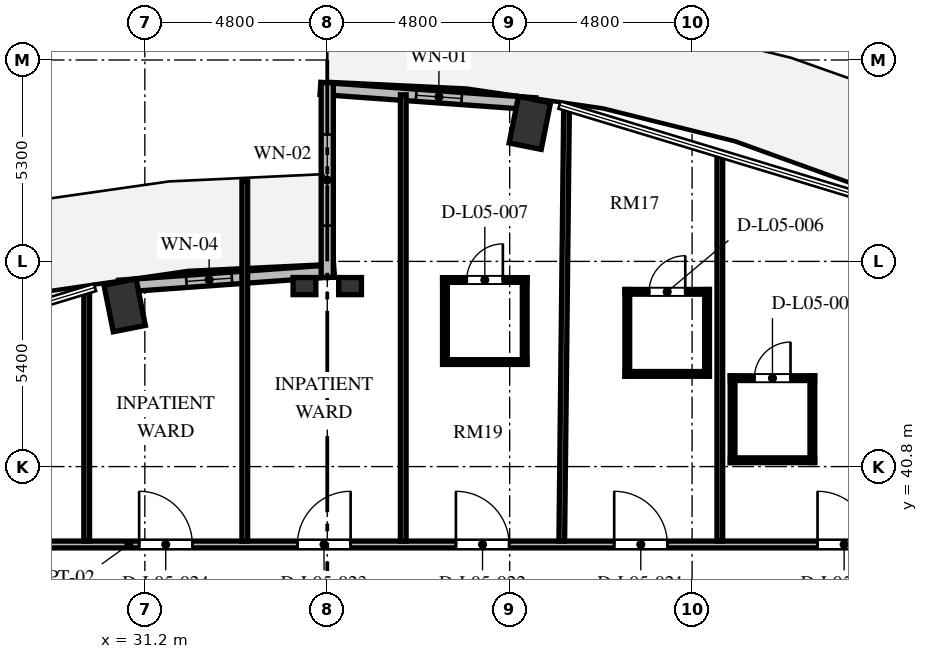
"""IFC4 building model, lengths in metres.
Left out: names, types, materials, properties, quantities, classifications, styles, units other than length and angle.
Written with IfcOpenShell. Run it as: python <this file> out.ifc"""

import sys

from ifc_helpers import new_model, si_unit, direction, frame, frame_2d, origin, origin_2d, place, context, subcontext, project, spatial, rectangle, extrude, element, fill, save


model = new_model("IFC4")
c1 = context("Model", 3, precision=1e-05, world=origin(), true_north=direction((0.0, 1.0)))
c2 = subcontext(c1, "Body", "Model", "MODEL_VIEW")
j1 = project(units=[si_unit("LENGTHUNIT", "METRE"), si_unit("PLANEANGLEUNIT", "RADIAN")], contexts=[c1])
p1 = place(None, origin())
s1 = spatial("IfcSite", under=j1, at=p1, CompositionType="ELEMENT")
p2 = place(p1, origin())
s2 = spatial("IfcBuilding", under=s1, at=p2, CompositionType="ELEMENT")
p3 = place(p2, frame((0.0, 0.0, 25.2)))
s3 = spatial("IfcBuildingStorey", under=s2, at=p3, CompositionType="ELEMENT", Elevation=25.2)
for number, where, z_axis, x_axis in (
    (1, (41.331, 49.844, 0.0), (0.0, 0.0, 1.0), (0.195, 0.981, 0.0)),
    (2, (30.669, 45.044, 0.0), (0.0, 0.0, 1.0), (-0.195, 0.981, 0.0)),
):
    element("IfcColumn", number, at=place(p3, frame(where, z_axis=z_axis, x_axis=x_axis)), inside=s3, PredefinedType="COLUMN", context=c2, shape_type="SweptSolid", body=[
        extrude(rectangle(XDim=1.25, YDim=0.86, at=origin_2d()), origin(), (0.0, 0.0, 1.0), 3.648),
    ])
for number, where, z_axis, x_axis in (
    (3, (35.4, 45.55, 0.0), (0.0, 0.0, 1.0), (1.0, 0.0, 0.0)),
    (4, (36.6, 45.55, 0.0), (0.0, 0.0, 1.0), (1.0, 0.0, 0.0)),
):
    element("IfcColumn", number, at=place(p3, frame(where, z_axis=z_axis, x_axis=x_axis)), inside=s3, PredefinedType="PILASTER", context=c2, shape_type="SweptSolid", body=[
        extrude(rectangle(XDim=0.6, YDim=0.45, at=origin_2d()), origin(), (0.0, 0.0, 1.0), 3.648),
    ])
p4 = place(p3, frame((41.481, 50.346, 0.0), z_axis=(0.0, 0.0, 1.0), x_axis=(-0.997422321809, 0.071754525696, 0.0)))
e5 = element("IfcWall", 5, at=p4, inside=s3, PredefinedType="SOLIDWALL", context=c2, shape_type="SweptSolid", body=[
    extrude(rectangle(XDim=5.675, YDim=0.32, at=frame_2d((2.838, 0.0))), origin(), (0.0, 0.0, 1.0), 3.428),
])
p5 = place(p4, frame((1.949, 0.0, 0.85)))
e6 = element("IfcOpeningElement", 6, at=p5, cuts=e5, PredefinedType="OPENING", context=c2, shape_type="SweptSolid", body=[
    extrude(rectangle(XDim=1.2, YDim=2.2, at=frame_2d((0.6, 1.1))), frame((0.0, 0.17, 0.0), z_axis=(0.0, -1.0, 0.0), x_axis=(1.0, 0.0, 0.0)), (0.0, 0.0, 1.0), 0.34),
])
p6 = place(p3, frame((36.179, 45.953, 0.0), z_axis=(0.0, 0.0, 1.0), x_axis=(-0.997421878774, -0.071760683825, 0.0)))
e7 = element("IfcWall", 7, at=p6, inside=s3, PredefinedType="SOLIDWALL", context=c2, shape_type="SweptSolid", body=[
    extrude(rectangle(XDim=5.675, YDim=0.32, at=frame_2d((2.837, 0.0))), origin(), (0.0, 0.0, 1.0), 3.428),
])
p7 = place(p6, frame((2.696, 0.0, 0.85)))
e8 = element("IfcOpeningElement", 8, at=p7, cuts=e7, PredefinedType="OPENING", context=c2, shape_type="SweptSolid", body=[
    extrude(rectangle(XDim=1.2, YDim=1.8, at=frame_2d((0.6, 0.9))), frame((0.0, 0.17, 0.0), z_axis=(0.0, -1.0, 0.0), x_axis=(1.0, 0.0, 0.0)), (0.0, 0.0, 1.0), 0.34),
])
p8 = place(p3, frame((36.0, 50.9, 0.0), z_axis=(0.0, 0.0, 1.0), x_axis=(0.0, -1.0, 0.0)))
e9 = element("IfcWall", 9, at=p8, inside=s3, PredefinedType="SOLIDWALL", context=c2, shape_type="SweptSolid", body=[
    extrude(rectangle(XDim=5.12, YDim=0.32, at=frame_2d((2.56, 0.0))), origin(), (0.0, 0.0, 1.0), 3.428),
])
p9 = place(p8, frame((1.36, 0.0, 0.84)))
e10 = element("IfcOpeningElement", 10, at=p9, cuts=e9, PredefinedType="OPENING", context=c2, shape_type="SweptSolid", body=[
    extrude(rectangle(XDim=2.4, YDim=2.04, at=frame_2d((1.2, 1.02))), frame((0.0, 0.17, 0.0), z_axis=(0.0, -1.0, 0.0), x_axis=(1.0, 0.0, 0.0)), (0.0, 0.0, 1.0), 0.34),
])
p10 = place(p3, frame((23.31, 38.75, 0.0), z_axis=(0.0, 0.0, 1.0), x_axis=(1.0, 0.0, 0.0)))
e11 = element("IfcWall", 11, at=p10, inside=s3, PredefinedType="PARTITIONING", context=c2, shape_type="SweptSolid", body=[
    extrude(rectangle(XDim=29.88, YDim=0.18, at=frame_2d((14.94, 0.0))), origin(), (0.0, 0.0, 1.0), 3.053),
])
p11 = place(p10, frame((25.591, 0.0, 0.0)))
e12 = element("IfcOpeningElement", 12, at=p11, cuts=e11, PredefinedType="OPENING", context=c2, shape_type="SweptSolid", body=[
    extrude(rectangle(XDim=1.4, YDim=2.2, at=frame_2d((0.7, 1.1))), frame((0.0, 0.1, 0.0), z_axis=(0.0, -1.0, 0.0), x_axis=(1.0, 0.0, 0.0)), (0.0, 0.0, 1.0), 0.2),
])
p12 = place(p10, frame((20.24, 0.0, 0.0)))
e13 = element("IfcOpeningElement", 13, at=p12, cuts=e11, PredefinedType="OPENING", context=c2, shape_type="SweptSolid", body=[
    extrude(rectangle(XDim=1.4, YDim=2.2, at=frame_2d((0.7, 1.1))), frame((0.0, 0.1, 0.0), z_axis=(0.0, -1.0, 0.0), x_axis=(1.0, 0.0, 0.0)), (0.0, 0.0, 1.0), 0.2),
])
p13 = place(p10, frame((16.075, 0.0, 0.0)))
e14 = element("IfcOpeningElement", 14, at=p13, cuts=e11, PredefinedType="OPENING", context=c2, shape_type="SweptSolid", body=[
    extrude(rectangle(XDim=1.4, YDim=2.2, at=frame_2d((0.7, 1.1))), frame((0.0, 0.1, 0.0), z_axis=(0.0, -1.0, 0.0), x_axis=(1.0, 0.0, 0.0)), (0.0, 0.0, 1.0), 0.2),
])
p14 = place(p10, frame((11.905, 0.0, 0.0)))
e15 = element("IfcOpeningElement", 15, at=p14, cuts=e11, PredefinedType="OPENING", context=c2, shape_type="SweptSolid", body=[
    extrude(rectangle(XDim=1.4, YDim=2.2, at=frame_2d((0.7, 1.1))), frame((0.0, 0.1, 0.0), z_axis=(0.0, -1.0, 0.0), x_axis=(1.0, 0.0, 0.0)), (0.0, 0.0, 1.0), 0.2),
])
p15 = place(p10, frame((7.74, 0.0, 0.0)))
e16 = element("IfcOpeningElement", 16, at=p15, cuts=e11, PredefinedType="OPENING", context=c2, shape_type="SweptSolid", body=[
    extrude(rectangle(XDim=1.4, YDim=2.2, at=frame_2d((0.7, 1.1))), frame((0.0, 0.1, 0.0), z_axis=(0.0, -1.0, 0.0), x_axis=(1.0, 0.0, 0.0)), (0.0, 0.0, 1.0), 0.2),
])
p16 = place(p10, frame((2.639, 0.0, 0.0)))
e17 = element("IfcOpeningElement", 17, at=p16, cuts=e11, PredefinedType="OPENING", context=c2, shape_type="SweptSolid", body=[
    extrude(rectangle(XDim=1.4, YDim=2.2, at=frame_2d((0.7, 1.1))), frame((0.0, 0.1, 0.0), z_axis=(0.0, -1.0, 0.0), x_axis=(1.0, 0.0, 0.0)), (0.0, 0.0, 1.0), 0.2),
])
p17 = place(p3, frame((29.67, 38.84, 0.0), z_axis=(0.0, 0.0, 1.0), x_axis=(0.0, 1.0, 0.0)))
e18 = element("IfcWall", 18, at=p17, inside=s3, PredefinedType="PARTITIONING", context=c2, shape_type="SweptSolid", body=[
    extrude(rectangle(XDim=6.596, YDim=0.15, at=frame_2d((3.298, 0.0))), origin(), (0.0, 0.0, 1.0), 3.428),
])
p18 = place(p3, frame((33.83, 38.84, 0.0), z_axis=(0.0, 0.0, 1.0), x_axis=(0.0, 1.0, 0.0)))
e19 = element("IfcWall", 19, at=p18, inside=s3, PredefinedType="PARTITIONING", context=c2, shape_type="SweptSolid", body=[
    extrude(rectangle(XDim=9.466, YDim=0.15, at=frame_2d((4.733, 0.0))), origin(), (0.0, 0.0, 1.0), 3.428),
])
p19 = place(p3, frame((38.0, 38.84, 0.0), z_axis=(0.0, 0.0, 1.0), x_axis=(0.0, 1.0, 0.0)))
e20 = element("IfcWall", 20, at=p19, inside=s3, PredefinedType="PARTITIONING", context=c2, shape_type="SweptSolid", body=[
    extrude(rectangle(XDim=11.743, YDim=0.15, at=frame_2d((5.872, 0.0))), origin(), (0.0, 0.0, 1.0), 3.428),
])
p20 = place(p3, frame((42.171, 38.84, 0.0), z_axis=(0.0, 0.0, 1.0), x_axis=(0.010986468696, 0.999939646932, 0.0)))
e21 = element("IfcWall", 21, at=p20, inside=s3, PredefinedType="PARTITIONING", context=c2, shape_type="SweptSolid", body=[
    extrude(rectangle(XDim=11.422, YDim=0.15, at=frame_2d((5.711, 0.0))), origin(), (0.0, 0.0, 1.0), 3.428),
])
p21 = place(p3, frame((46.33, 38.84, 0.0), z_axis=(0.0, 0.0, 1.0), x_axis=(0.0, 1.0, 0.0)))
e22 = element("IfcWall", 22, at=p21, inside=s3, PredefinedType="PARTITIONING", context=c2, shape_type="SweptSolid", body=[
    extrude(rectangle(XDim=10.185, YDim=0.15, at=frame_2d((5.092, 0.0))), origin(), (0.0, 0.0, 1.0), 3.428),
])
p22 = place(p3, frame((46.605, 43.127, 0.0), z_axis=(0.0, 0.0, 1.0), x_axis=(1.0, 0.0, 0.0)))
e23 = element("IfcWall", 23, at=p22, inside=s3, PredefinedType="PARTITIONING", context=c2, shape_type="SweptSolid", body=[
    extrude(rectangle(XDim=2.22, YDim=0.125, at=frame_2d((1.11, 0.0))), origin(), (0.0, 0.0, 1.0), 3.428),
])
p23 = place(p22, frame((0.635, 0.0, 0.0)))
e24 = element("IfcOpeningElement", 24, at=p23, cuts=e23, PredefinedType="OPENING", context=c2, shape_type="SweptSolid", body=[
    extrude(rectangle(XDim=0.95, YDim=2.1, at=frame_2d((0.475, 1.05))), frame((0.0, 0.073, 0.0), z_axis=(0.0, -1.0, 0.0), x_axis=(1.0, 0.0, 0.0)), (0.0, 0.0, 1.0), 0.145),
])
p24 = place(p3, frame((46.605, 40.967, 0.0), z_axis=(0.0, 0.0, 1.0), x_axis=(1.0, 0.0, 0.0)))
e25 = element("IfcWall", 25, at=p24, inside=s3, PredefinedType="PARTITIONING", context=c2, shape_type="SweptSolid", body=[
    extrude(rectangle(XDim=2.22, YDim=0.125, at=frame_2d((1.11, 0.0))), origin(), (0.0, 0.0, 1.0), 3.428),
])
for number, where, z_axis, x_axis in (
    (26, (48.765, 40.907, 0.0), (0.0, 0.0, 1.0), (0.0, 1.0, 0.0)),
    (27, (46.665, 40.907, 0.0), (0.0, 0.0, 1.0), (0.0, 1.0, 0.0)),
):
    element("IfcWall", number, at=place(p3, frame(where, z_axis=z_axis, x_axis=x_axis)), inside=s3, PredefinedType="PARTITIONING", context=c2, shape_type="SweptSolid", body=[
        extrude(rectangle(XDim=2.28, YDim=0.125, at=frame_2d((1.14, 0.0))), origin(), (0.0, 0.0, 1.0), 3.428),
    ])
p25 = place(p3, frame((43.835, 45.399, 0.0), z_axis=(0.0, 0.0, 1.0), x_axis=(1.0, 0.0, 0.0)))
e28 = element("IfcWall", 28, at=p25, inside=s3, PredefinedType="PARTITIONING", context=c2, shape_type="SweptSolid", body=[
    extrude(rectangle(XDim=2.22, YDim=0.125, at=frame_2d((1.11, 0.0))), origin(), (0.0, 0.0, 1.0), 3.013),
])
p26 = place(p25, frame((0.635, 0.0, 0.0)))
e29 = element("IfcOpeningElement", 29, at=p26, cuts=e28, PredefinedType="OPENING", context=c2, shape_type="SweptSolid", body=[
    extrude(rectangle(XDim=0.95, YDim=2.1, at=frame_2d((0.475, 1.05))), frame((0.0, 0.073, 0.0), z_axis=(0.0, -1.0, 0.0), x_axis=(1.0, 0.0, 0.0)), (0.0, 0.0, 1.0), 0.145),
])
p27 = place(p3, frame((43.835, 43.239, 0.0), z_axis=(0.0, 0.0, 1.0), x_axis=(1.0, 0.0, 0.0)))
e30 = element("IfcWall", 30, at=p27, inside=s3, PredefinedType="PARTITIONING", context=c2, shape_type="SweptSolid", body=[
    extrude(rectangle(XDim=2.22, YDim=0.125, at=frame_2d((1.11, 0.0))), origin(), (0.0, 0.0, 1.0), 3.053),
])
for number, where, z_axis, x_axis in (
    (31, (45.995, 43.179, 0.0), (0.0, 0.0, 1.0), (0.0, 1.0, 0.0)),
    (32, (43.895, 43.179, 0.0), (0.0, 0.0, 1.0), (0.0, 1.0, 0.0)),
):
    element("IfcWall", number, at=place(p3, frame(where, z_axis=z_axis, x_axis=x_axis)), inside=s3, PredefinedType="PARTITIONING", context=c2, shape_type="SweptSolid", body=[
        extrude(rectangle(XDim=2.28, YDim=0.125, at=frame_2d((1.14, 0.0))), origin(), (0.0, 0.0, 1.0), 3.428),
    ])
p28 = place(p3, frame((39.036, 45.711, 0.0), z_axis=(0.0, 0.0, 1.0), x_axis=(1.0, 0.0, 0.0)))
e33 = element("IfcWall", 33, at=p28, inside=s3, PredefinedType="PARTITIONING", context=c2, shape_type="SweptSolid", body=[
    extrude(rectangle(XDim=2.22, YDim=0.125, at=frame_2d((1.11, 0.0))), origin(), (0.0, 0.0, 1.0), 3.428),
])
p29 = place(p28, frame((0.635, 0.0, 0.0)))
e34 = element("IfcOpeningElement", 34, at=p29, cuts=e33, PredefinedType="OPENING", context=c2, shape_type="SweptSolid", body=[
    extrude(rectangle(XDim=0.95, YDim=2.1, at=frame_2d((0.475, 1.05))), frame((0.0, 0.073, 0.0), z_axis=(0.0, -1.0, 0.0), x_axis=(1.0, 0.0, 0.0)), (0.0, 0.0, 1.0), 0.145),
])
p30 = place(p3, frame((39.036, 43.551, 0.0), z_axis=(0.0, 0.0, 1.0), x_axis=(1.0, 0.0, 0.0)))
e35 = element("IfcWall", 35, at=p30, inside=s3, PredefinedType="PARTITIONING", context=c2, shape_type="SweptSolid", body=[
    extrude(rectangle(XDim=2.22, YDim=0.125, at=frame_2d((1.11, 0.0))), origin(), (0.0, 0.0, 1.0), 3.428),
])
for number, where, z_axis, x_axis in (
    (36, (41.196, 43.491, 0.0), (0.0, 0.0, 1.0), (0.0, 1.0, 0.0)),
    (37, (39.096, 43.491, 0.0), (0.0, 0.0, 1.0), (0.0, 1.0, 0.0)),
):
    element("IfcWall", number, at=place(p3, frame(where, z_axis=z_axis, x_axis=x_axis)), inside=s3, PredefinedType="PARTITIONING", context=c2, shape_type="SweptSolid", body=[
        extrude(rectangle(XDim=2.28, YDim=0.125, at=frame_2d((1.14, 0.0))), origin(), (0.0, 0.0, 1.0), 3.428),
    ])
p31 = place(p5, origin())
e38 = element("IfcWindow", 38, at=p31, inside=s3, PartitioningType="SINGLE_PANEL", PredefinedType="WINDOW", context=c2, shape_type="SweptSolid", body=[
    extrude(rectangle(XDim=1.2, YDim=2.2, at=frame_2d((0.6, 1.1))), frame((0.0, 0.03, 0.0), z_axis=(0.0, -1.0, 0.0), x_axis=(1.0, 0.0, 0.0)), (0.0, 0.0, 1.0), 0.06),
])
fill(e6, e38)
p32 = place(p7, origin())
e39 = element("IfcWindow", 39, at=p32, inside=s3, PartitioningType="SINGLE_PANEL", PredefinedType="WINDOW", context=c2, shape_type="SweptSolid", body=[
    extrude(rectangle(XDim=1.2, YDim=1.8, at=frame_2d((0.6, 0.9))), frame((0.0, 0.03, 0.0), z_axis=(0.0, -1.0, 0.0), x_axis=(1.0, 0.0, 0.0)), (0.0, 0.0, 1.0), 0.06),
])
fill(e8, e39)
p33 = place(p9, origin())
e40 = element("IfcWindow", 40, at=p33, inside=s3, PartitioningType="SINGLE_PANEL", PredefinedType="WINDOW", context=c2, shape_type="SweptSolid", body=[
    extrude(rectangle(XDim=2.4, YDim=2.04, at=frame_2d((1.2, 1.02))), frame((0.0, 0.03, 0.0), z_axis=(0.0, -1.0, 0.0), x_axis=(1.0, 0.0, 0.0)), (0.0, 0.0, 1.0), 0.06),
])
fill(e10, e40)
p34 = place(p23, origin())
e41 = element("IfcDoor", 41, at=p34, inside=s3, OperationType="SINGLE_SWING_RIGHT", PredefinedType="DOOR", context=c2, shape_type="SweptSolid", body=[
    extrude(rectangle(XDim=0.95, YDim=2.1, at=frame_2d((0.475, 1.05))), frame((0.0, 0.025, 0.0), z_axis=(0.0, -1.0, 0.0), x_axis=(1.0, 0.0, 0.0)), (0.0, 0.0, 1.0), 0.05),
])
fill(e24, e41)
p35 = place(p11, origin())
e42 = element("IfcDoor", 42, at=p35, inside=s3, OperationType="SINGLE_SWING_LEFT", PredefinedType="DOOR", context=c2, shape_type="SweptSolid", body=[
    extrude(rectangle(XDim=1.4, YDim=2.2, at=frame_2d((0.7, 1.1))), frame((0.0, 0.025, 0.0), z_axis=(0.0, -1.0, 0.0), x_axis=(1.0, 0.0, 0.0)), (0.0, 0.0, 1.0), 0.05),
])
fill(e12, e42)
p36 = place(p26, origin())
e43 = element("IfcDoor", 43, at=p36, inside=s3, OperationType="SINGLE_SWING_RIGHT", PredefinedType="DOOR", context=c2, shape_type="SweptSolid", body=[
    extrude(rectangle(XDim=0.95, YDim=2.1, at=frame_2d((0.475, 1.05))), frame((0.0, 0.025, 0.0), z_axis=(0.0, -1.0, 0.0), x_axis=(1.0, 0.0, 0.0)), (0.0, 0.0, 1.0), 0.05),
])
fill(e29, e43)
p37 = place(p12, origin())
e44 = element("IfcDoor", 44, at=p37, inside=s3, OperationType="SINGLE_SWING_LEFT", PredefinedType="DOOR", context=c2, shape_type="SweptSolid", body=[
    extrude(rectangle(XDim=1.4, YDim=2.2, at=frame_2d((0.7, 1.1))), frame((0.0, 0.025, 0.0), z_axis=(0.0, -1.0, 0.0), x_axis=(1.0, 0.0, 0.0)), (0.0, 0.0, 1.0), 0.05),
])
fill(e13, e44)
p38 = place(p29, origin())
e45 = element("IfcDoor", 45, at=p38, inside=s3, OperationType="SINGLE_SWING_RIGHT", PredefinedType="DOOR", context=c2, shape_type="SweptSolid", body=[
    extrude(rectangle(XDim=0.95, YDim=2.1, at=frame_2d((0.475, 1.05))), frame((0.0, 0.025, 0.0), z_axis=(0.0, -1.0, 0.0), x_axis=(1.0, 0.0, 0.0)), (0.0, 0.0, 1.0), 0.05),
])
fill(e34, e45)
p39 = place(p13, origin())
e46 = element("IfcDoor", 46, at=p39, inside=s3, OperationType="SINGLE_SWING_LEFT", PredefinedType="DOOR", context=c2, shape_type="SweptSolid", body=[
    extrude(rectangle(XDim=1.4, YDim=2.2, at=frame_2d((0.7, 1.1))), frame((0.0, 0.025, 0.0), z_axis=(0.0, -1.0, 0.0), x_axis=(1.0, 0.0, 0.0)), (0.0, 0.0, 1.0), 0.05),
])
fill(e14, e46)
p40 = place(p14, origin())
e47 = element("IfcDoor", 47, at=p40, inside=s3, OperationType="SINGLE_SWING_RIGHT", PredefinedType="DOOR", context=c2, shape_type="SweptSolid", body=[
    extrude(rectangle(XDim=1.4, YDim=2.2, at=frame_2d((0.7, 1.1))), frame((0.0, 0.025, 0.0), z_axis=(0.0, -1.0, 0.0), x_axis=(1.0, 0.0, 0.0)), (0.0, 0.0, 1.0), 0.05),
])
fill(e15, e47)
p41 = place(p15, origin())
e48 = element("IfcDoor", 48, at=p41, inside=s3, OperationType="SINGLE_SWING_LEFT", PredefinedType="DOOR", context=c2, shape_type="SweptSolid", body=[
    extrude(rectangle(XDim=1.4, YDim=2.2, at=frame_2d((0.7, 1.1))), frame((0.0, 0.025, 0.0), z_axis=(0.0, -1.0, 0.0), x_axis=(1.0, 0.0, 0.0)), (0.0, 0.0, 1.0), 0.05),
])
fill(e16, e48)
save(model, sys.argv[1])
